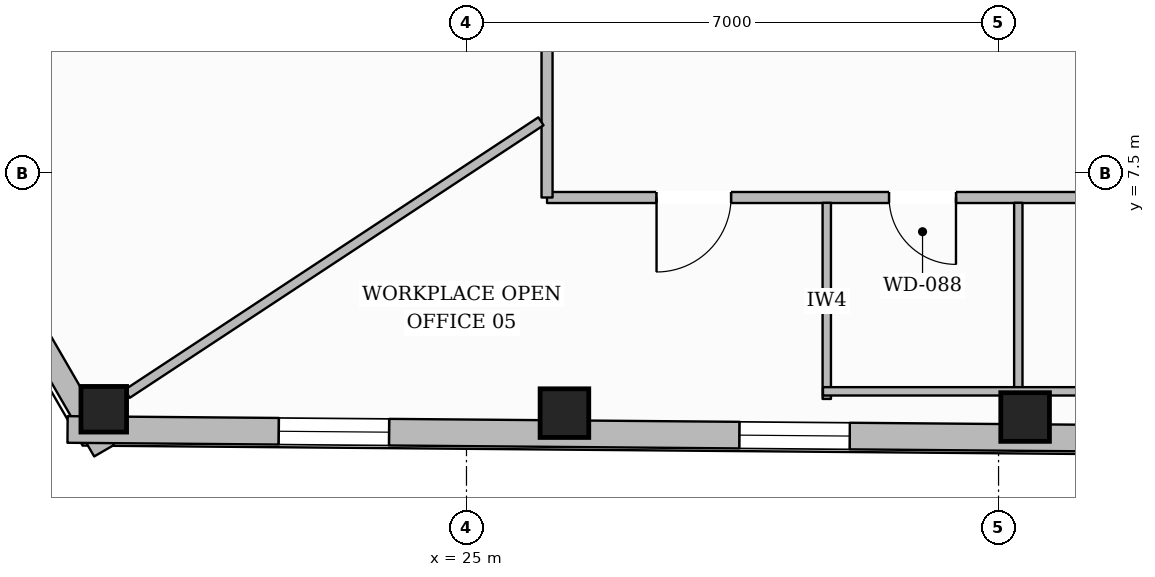
"""IFC4 building model, lengths in metres.
Left out: names, types, materials, properties, quantities, classifications, styles, units other than length and angle.
Written with IfcOpenShell. Run it as: python <this file> out.ifc"""

import sys

from ifc_helpers import new_model, si_unit, direction, frame, frame_2d, origin, origin_2d, place, context, subcontext, project, spatial, rectangle, hollow_rectangle, extrude, element, fill, save


model = new_model("IFC4")
c1 = context("Model", 3, precision=1e-05, world=origin(), true_north=direction((0.0, 1.0)))
c2 = subcontext(c1, "Body", "Model", "MODEL_VIEW")
j1 = project(units=[si_unit("LENGTHUNIT", "METRE"), si_unit("PLANEANGLEUNIT", "RADIAN")], contexts=[c1])
p1 = place(None, origin())
s1 = spatial("IfcSite", under=j1, at=p1, CompositionType="ELEMENT")
p2 = place(p1, origin())
s2 = spatial("IfcBuilding", under=s1, at=p2, CompositionType="ELEMENT")
p3 = place(p2, frame((0.0, 0.0, 176.55)))
s3 = spatial("IfcBuildingStorey", under=s2, at=p3, CompositionType="ELEMENT", Elevation=176.55)
p4 = place(p3, frame((20.228, 4.394, 0.0), z_axis=(0.0, 0.0, 1.0), x_axis=(1.0, 0.0, 0.0)))
e1 = element("IfcColumn", 1, at=p4, inside=s3, PredefinedType="COLUMN", context=c2, shape_type="SweptSolid", body=[
    extrude(hollow_rectangle(XDim=0.6, YDim=0.6, WallThickness=0.028, at=origin_2d()), origin(), (0.0, 0.0, 1.0), 3.6),
])
for number, where, z_axis, x_axis in (
    (2, (26.289, 4.343, 0.0), (0.0, 0.0, 1.0), (1.0, 0.0, 0.0)),
    (3, (32.35, 4.292, 0.0), (0.0, 0.0, 1.0), (1.0, 0.0, 0.0)),
):
    element("IfcColumn", number, at=place(p3, frame(where, z_axis=z_axis, x_axis=x_axis)), inside=s3, PredefinedType="COLUMN", context=c2, shape_type="SweptSolid", body=[
        extrude(hollow_rectangle(XDim=0.64, YDim=0.64, WallThickness=0.028, at=origin_2d()), origin(), (0.0, 0.0, 1.0), 3.6),
    ])
p5 = place(p3, frame((20.232, 3.849, 0.0), z_axis=(0.0, 0.0, 1.0), x_axis=(-0.501026823905, 0.865431754517, 0.0)))
e4 = element("IfcWall", 4, at=p5, inside=s3, PredefinedType="STANDARD", context=c2, shape_type="SweptSolid", body=[
    extrude(rectangle(XDim=10.188, YDim=0.3, at=frame_2d((5.094, 0.0))), origin(), (0.0, 0.0, 1.0), 3.132),
])
p6 = place(p5, frame((4.569, 0.0, 0.65)))
e5 = element("IfcOpeningElement", 5, at=p6, cuts=e4, PredefinedType="OPENING", context=c2, shape_type="SweptSolid", body=[
    extrude(rectangle(XDim=1.05, YDim=1.7, at=frame_2d((0.525, 0.85))), frame((0.0, 0.16, 0.0), z_axis=(0.0, -1.0, 0.0), x_axis=(1.0, 0.0, 0.0)), (0.0, 0.0, 1.0), 0.32),
])
p7 = place(p3, frame((57.072, 3.814, 0.0), z_axis=(0.0, 0.0, 1.0), x_axis=(-0.999964560475, 0.008418895034, 0.0)))
e6 = element("IfcWall", 6, at=p7, inside=s3, PredefinedType="STANDARD", context=c2, shape_type="SweptSolid", body=[
    extrude(rectangle(XDim=37.322, YDim=0.35, at=frame_2d((18.661, 0.0))), origin(), (0.0, 0.0, 1.0), 3.132),
])
p8 = place(p7, frame((33.092, 0.0, 0.65)))
e7 = element("IfcOpeningElement", 7, at=p8, cuts=e6, PredefinedType="OPENING", context=c2, shape_type="SweptSolid", body=[
    extrude(rectangle(XDim=1.45, YDim=1.75, at=frame_2d((0.725, 0.875))), frame((0.0, 0.185, 0.0), z_axis=(0.0, -1.0, 0.0), x_axis=(1.0, 0.0, 0.0)), (0.0, 0.0, 1.0), 0.37),
])
p9 = place(p7, frame((27.031, 0.0, 0.65)))
e8 = element("IfcOpeningElement", 8, at=p9, cuts=e6, PredefinedType="OPENING", context=c2, shape_type="SweptSolid", body=[
    extrude(rectangle(XDim=1.45, YDim=1.75, at=frame_2d((0.725, 0.875))), frame((0.0, 0.185, 0.0), z_axis=(0.0, -1.0, 0.0), x_axis=(1.0, 0.0, 0.0)), (0.0, 0.0, 1.0), 0.37),
])
p10 = place(p7, frame((20.97, 0.0, 0.65)))
e9 = element("IfcOpeningElement", 9, at=p10, cuts=e6, PredefinedType="OPENING", context=c2, shape_type="SweptSolid", body=[
    extrude(rectangle(XDim=1.45, YDim=1.75, at=frame_2d((0.725, 0.875))), frame((0.0, 0.185, 0.0), z_axis=(0.0, -1.0, 0.0), x_axis=(1.0, 0.0, 0.0)), (0.0, 0.0, 1.0), 0.37),
])
p11 = place(p7, frame((8.849, 0.0, 0.65)))
e10 = element("IfcOpeningElement", 10, at=p11, cuts=e6, PredefinedType="OPENING", context=c2, shape_type="SweptSolid", body=[
    extrude(rectangle(XDim=1.45, YDim=1.75, at=frame_2d((0.725, 0.875))), frame((0.0, 0.185, 0.0), z_axis=(0.0, -1.0, 0.0), x_axis=(1.0, 0.0, 0.0)), (0.0, 0.0, 1.0), 0.37),
])
p12 = place(p7, frame((2.788, 0.0, 0.65)))
e11 = element("IfcOpeningElement", 11, at=p12, cuts=e6, PredefinedType="OPENING", context=c2, shape_type="SweptSolid", body=[
    extrude(rectangle(XDim=1.45, YDim=1.75, at=frame_2d((0.725, 0.875))), frame((0.0, 0.185, 0.0), z_axis=(0.0, -1.0, 0.0), x_axis=(1.0, 0.0, 0.0)), (0.0, 0.0, 1.0), 0.37),
])
p13 = place(p3, frame((49.94, 7.18, 0.0), z_axis=(0.0, 0.0, 1.0), x_axis=(-1.0, 0.0, 0.0)))
e12 = element("IfcWall", 12, at=p13, inside=s3, PredefinedType="PARTITIONING", context=c2, shape_type="SweptSolid", body=[
    extrude(rectangle(XDim=23.88, YDim=0.145, at=frame_2d((11.94, 0.0))), origin(), (0.0, 0.0, 1.0), 3.6),
])
p14 = place(p13, frame((18.5, 0.0, 0.0)))
e13 = element("IfcOpeningElement", 13, at=p14, cuts=e12, PredefinedType="OPENING", context=c2, shape_type="SweptSolid", body=[
    extrude(rectangle(XDim=0.88, YDim=2.1, at=frame_2d((0.44, 1.05))), frame((0.0, 0.083, 0.0), z_axis=(0.0, -1.0, 0.0), x_axis=(1.0, 0.0, 0.0)), (0.0, 0.0, 1.0), 0.165),
])
p15 = place(p13, frame((15.98, 0.0, 0.0)))
e14 = element("IfcOpeningElement", 14, at=p15, cuts=e12, PredefinedType="OPENING", context=c2, shape_type="SweptSolid", body=[
    extrude(rectangle(XDim=0.88, YDim=2.1, at=frame_2d((0.44, 1.05))), frame((0.0, 0.083, 0.0), z_axis=(0.0, -1.0, 0.0), x_axis=(1.0, 0.0, 0.0)), (0.0, 0.0, 1.0), 0.165),
])
p16 = place(p13, frame((13.52, 0.0, 0.0)))
e15 = element("IfcOpeningElement", 15, at=p16, cuts=e12, PredefinedType="OPENING", context=c2, shape_type="SweptSolid", body=[
    extrude(rectangle(XDim=0.96, YDim=2.1, at=frame_2d((0.48, 1.05))), frame((0.0, 0.083, 0.0), z_axis=(0.0, -1.0, 0.0), x_axis=(1.0, 0.0, 0.0)), (0.0, 0.0, 1.0), 0.165),
])
p17 = place(p13, frame((21.459, 0.0, 0.0)))
e16 = element("IfcOpeningElement", 16, at=p17, cuts=e12, PredefinedType="OPENING", context=c2, shape_type="SweptSolid", body=[
    extrude(rectangle(XDim=0.98, YDim=2.15, at=frame_2d((0.49, 1.075))), frame((0.0, 0.083, 0.0), z_axis=(0.0, -1.0, 0.0), x_axis=(1.0, 0.0, 0.0)), (0.0, 0.0, 1.0), 0.165),
])
p18 = place(p13, frame((9.471, 0.0, 0.0)))
e17 = element("IfcOpeningElement", 17, at=p18, cuts=e12, PredefinedType="OPENING", context=c2, shape_type="SweptSolid", body=[
    extrude(rectangle(XDim=0.98, YDim=2.15, at=frame_2d((0.49, 1.075))), frame((0.0, 0.083, 0.0), z_axis=(0.0, -1.0, 0.0), x_axis=(1.0, 0.0, 0.0)), (0.0, 0.0, 1.0), 0.165),
])
p19 = place(p3, frame((26.06, 7.18, 0.0), z_axis=(0.0, 0.0, 1.0), x_axis=(0.0, 1.0, 0.0)))
e18 = element("IfcWall", 18, at=p19, inside=s3, PredefinedType="PARTITIONING", context=c2, shape_type="SweptSolid", body=[
    extrude(rectangle(XDim=4.97, YDim=0.145, at=frame_2d((2.485, 0.0))), origin(), (0.0, 0.0, 1.0), 3.6),
])
p20 = place(p19, frame((2.225, 0.0, 0.0)))
e19 = element("IfcOpeningElement", 19, at=p20, cuts=e18, PredefinedType="OPENING", context=c2, shape_type="SweptSolid", body=[
    extrude(rectangle(XDim=1.4, YDim=2.2, at=frame_2d((0.7, 1.1))), frame((0.0, 0.083, 0.0), z_axis=(0.0, -1.0, 0.0), x_axis=(1.0, 0.0, 0.0)), (0.0, 0.0, 1.0), 0.165),
])
p21 = place(p3, frame((29.74, 4.53, 0.0), z_axis=(0.0, 0.0, 1.0), x_axis=(0.0, 1.0, 0.0)))
e20 = element("IfcWall", 20, at=p21, inside=s3, PredefinedType="PLUMBINGWALL", context=c2, shape_type="SweptSolid", body=[
    extrude(rectangle(XDim=2.58, YDim=0.11, at=frame_2d((1.29, 0.0))), origin(), (0.0, 0.0, 1.0), 3.6),
])
p22 = place(p3, frame((32.26, 4.53, 0.0), z_axis=(0.0, 0.0, 1.0), x_axis=(0.0, 1.0, 0.0)))
e21 = element("IfcWall", 21, at=p22, inside=s3, PredefinedType="PLUMBINGWALL", context=c2, shape_type="SweptSolid", body=[
    extrude(rectangle(XDim=2.58, YDim=0.11, at=frame_2d((1.29, 0.0))), origin(), (0.0, 0.0, 1.0), 3.141),
])
p23 = place(p3, frame((29.69, 4.63, 0.0), z_axis=(0.0, 0.0, 1.0), x_axis=(1.0, 0.0, 0.0)))
e22 = element("IfcWall", 22, at=p23, inside=s3, PredefinedType="PLUMBINGWALL", context=c2, shape_type="SweptSolid", body=[
    extrude(rectangle(XDim=7.46, YDim=0.11, at=frame_2d((3.73, 0.0))), origin(), (0.0, 0.0, 1.0), 3.6),
])
p24 = place(p3, frame((25.979, 8.182, 0.0), z_axis=(0.0, 0.0, 1.0), x_axis=(-0.835114630122, -0.550075953443, 0.0)))
e23 = element("IfcWall", 23, at=p24, inside=s3, PredefinedType="PARTITIONING", context=c2, shape_type="SweptSolid", body=[
    extrude(rectangle(XDim=6.518, YDim=0.125, at=frame_2d((3.259, 0.0))), origin(), (0.0, 0.0, 1.0), 3.141),
])
p25 = place(p8, origin())
e24 = element("IfcWindow", 24, at=p25, inside=s3, PartitioningType="SINGLE_PANEL", PredefinedType="WINDOW", context=c2, shape_type="SweptSolid", body=[
    extrude(rectangle(XDim=1.45, YDim=1.75, at=frame_2d((0.725, 0.875))), frame((0.0, 0.03, 0.0), z_axis=(0.0, -1.0, 0.0), x_axis=(1.0, 0.0, 0.0)), (0.0, 0.0, 1.0), 0.06),
])
fill(e7, e24)
p26 = place(p9, origin())
e25 = element("IfcWindow", 25, at=p26, inside=s3, PartitioningType="SINGLE_PANEL", PredefinedType="WINDOW", context=c2, shape_type="SweptSolid", body=[
    extrude(rectangle(XDim=1.45, YDim=1.75, at=frame_2d((0.725, 0.875))), frame((0.0, 0.03, 0.0), z_axis=(0.0, -1.0, 0.0), x_axis=(1.0, 0.0, 0.0)), (0.0, 0.0, 1.0), 0.06),
])
fill(e8, e25)
p27 = place(p14, origin())
e26 = element("IfcDoor", 26, at=p27, inside=s3, OperationType="SINGLE_SWING_LEFT", PredefinedType="DOOR", context=c2, shape_type="SweptSolid", body=[
    extrude(rectangle(XDim=0.88, YDim=2.1, at=frame_2d((0.44, 1.05))), frame((0.0, 0.025, 0.0), z_axis=(0.0, -1.0, 0.0), x_axis=(1.0, 0.0, 0.0)), (0.0, 0.0, 1.0), 0.05),
])
fill(e13, e26)
p28 = place(p17, origin())
e27 = element("IfcDoor", 27, at=p28, inside=s3, OperationType="SINGLE_SWING_RIGHT", PredefinedType="DOOR", context=c2, shape_type="SweptSolid", body=[
    extrude(rectangle(XDim=0.98, YDim=2.15, at=frame_2d((0.49, 1.075))), frame((0.0, 0.025, 0.0), z_axis=(0.0, -1.0, 0.0), x_axis=(1.0, 0.0, 0.0)), (0.0, 0.0, 1.0), 0.05),
])
fill(e16, e27)
save(model, sys.argv[1])
